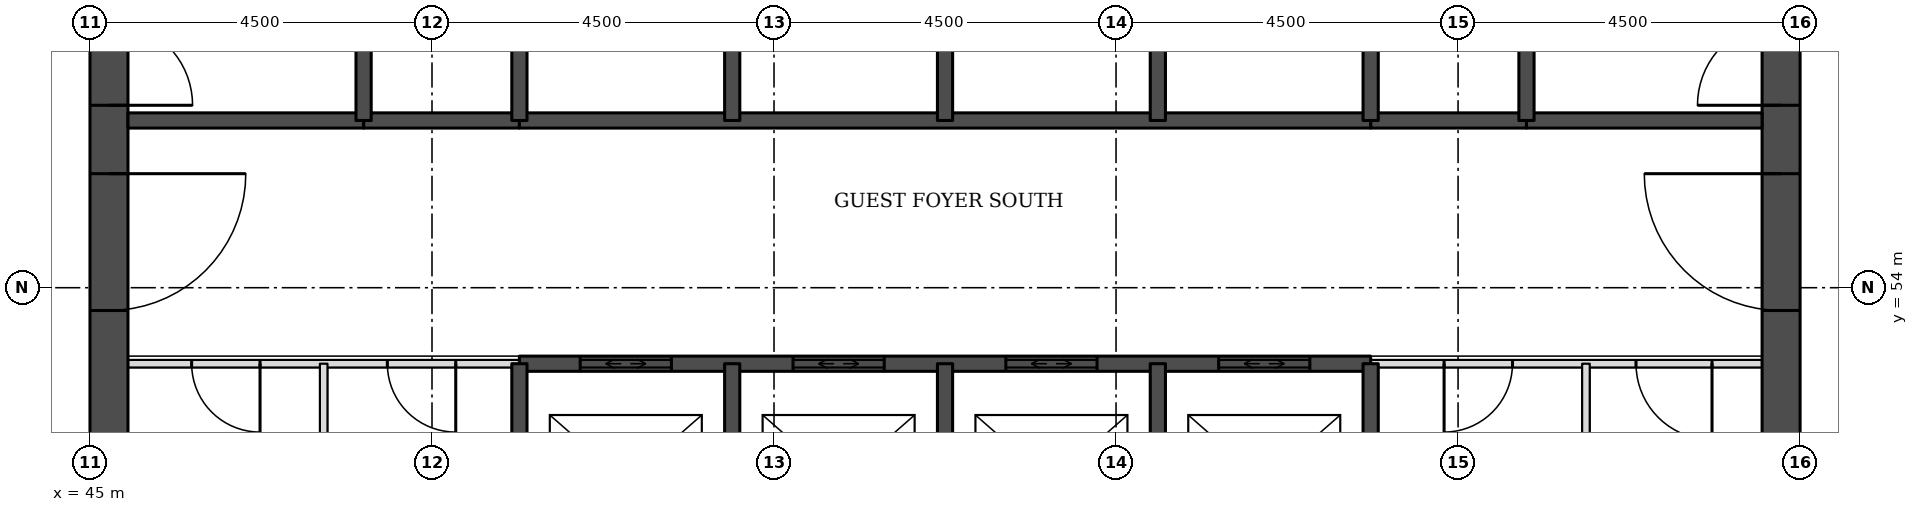
"""IFC4 building model, lengths in metres.
Left out: names, types, materials, properties, quantities, classifications, styles, units other than length and angle.
Written with IfcOpenShell. Run it as: python <this file> out.ifc"""

import sys

from ifc_helpers import new_model, si_unit, direction, frame, frame_2d, origin, place, context, subcontext, project, spatial, rectangle, extrude, element, fill, save


model = new_model("IFC4")
c1 = context("Model", 3, precision=1e-05, world=origin(), true_north=direction((0.0, 1.0)))
c2 = subcontext(c1, "Body", "Model", "MODEL_VIEW")
j1 = project(units=[si_unit("LENGTHUNIT", "METRE"), si_unit("PLANEANGLEUNIT", "RADIAN")], contexts=[c1])
p1 = place(None, origin())
s1 = spatial("IfcSite", under=j1, at=p1, CompositionType="ELEMENT")
p2 = place(p1, origin())
s2 = spatial("IfcBuilding", under=s1, at=p2, CompositionType="ELEMENT")
p3 = place(p2, frame((0.0, 0.0, 62.7)))
s3 = spatial("IfcBuildingStorey", under=s2, at=p3, CompositionType="ELEMENT", Elevation=62.7)
p4 = place(p3, frame((45.25, 49.5, 0.0), z_axis=(0.0, 0.0, 1.0), x_axis=(0.0, 1.0, 0.0)))
e1 = element("IfcWall", 1, at=p4, inside=s3, PredefinedType="SHEAR", context=c2, shape_type="SweptSolid", body=[
    extrude(rectangle(XDim=22.5, YDim=0.5, at=frame_2d((11.25, 0.0))), origin(), (0.0, 0.0, 1.0), 3.3),
])
p5 = place(p4, frame((4.2, 0.0, 0.0)))
e2 = element("IfcOpeningElement", 2, at=p5, cuts=e1, PredefinedType="OPENING", context=c2, shape_type="SweptSolid", body=[
    extrude(rectangle(XDim=1.8, YDim=2.1, at=frame_2d((0.9, 1.05))), frame((0.0, 0.26, 0.0), z_axis=(0.0, -1.0, 0.0), x_axis=(1.0, 0.0, 0.0)), (0.0, 0.0, 1.0), 0.52),
])
p6 = place(p4, frame((6.9, 0.0, 0.0)))
e3 = element("IfcOpeningElement", 3, at=p6, cuts=e1, PredefinedType="OPENING", context=c2, shape_type="SweptSolid", body=[
    extrude(rectangle(XDim=1.1, YDim=2.1, at=frame_2d((0.55, 1.05))), frame((0.0, 0.26, 0.0), z_axis=(0.0, -1.0, 0.0), x_axis=(1.0, 0.0, 0.0)), (0.0, 0.0, 1.0), 0.52),
])
p7 = place(p4, frame((13.6, 0.0, 0.0)))
e4 = element("IfcOpeningElement", 4, at=p7, cuts=e1, PredefinedType="OPENING", context=c2, shape_type="SweptSolid", body=[
    extrude(rectangle(XDim=1.1, YDim=2.1, at=frame_2d((0.55, 1.05))), frame((0.0, 0.26, 0.0), z_axis=(0.0, -1.0, 0.0), x_axis=(1.0, 0.0, 0.0)), (0.0, 0.0, 1.0), 0.52),
])
p8 = place(p4, frame((16.5, 0.0, 0.0)))
e5 = element("IfcOpeningElement", 5, at=p8, cuts=e1, PredefinedType="OPENING", context=c2, shape_type="SweptSolid", body=[
    extrude(rectangle(XDim=1.8, YDim=2.1, at=frame_2d((0.9, 1.05))), frame((0.0, 0.26, 0.0), z_axis=(0.0, -1.0, 0.0), x_axis=(1.0, 0.0, 0.0)), (0.0, 0.0, 1.0), 0.52),
])
p9 = place(p3, frame((67.25, 49.5, 0.0), z_axis=(0.0, 0.0, 1.0), x_axis=(0.0, 1.0, 0.0)))
e6 = element("IfcWall", 6, at=p9, inside=s3, PredefinedType="SHEAR", context=c2, shape_type="SweptSolid", body=[
    extrude(rectangle(XDim=22.5, YDim=0.5, at=frame_2d((11.25, 0.0))), origin(), (0.0, 0.0, 1.0), 3.3),
])
p10 = place(p9, frame((4.2, 0.0, 0.0)))
e7 = element("IfcOpeningElement", 7, at=p10, cuts=e6, PredefinedType="OPENING", context=c2, shape_type="SweptSolid", body=[
    extrude(rectangle(XDim=1.8, YDim=2.1, at=frame_2d((0.9, 1.05))), frame((0.0, 0.26, 0.0), z_axis=(0.0, -1.0, 0.0), x_axis=(1.0, 0.0, 0.0)), (0.0, 0.0, 1.0), 0.52),
])
p11 = place(p9, frame((6.9, 0.0, 0.0)))
e8 = element("IfcOpeningElement", 8, at=p11, cuts=e6, PredefinedType="OPENING", context=c2, shape_type="SweptSolid", body=[
    extrude(rectangle(XDim=1.1, YDim=2.1, at=frame_2d((0.55, 1.05))), frame((0.0, 0.26, 0.0), z_axis=(0.0, -1.0, 0.0), x_axis=(1.0, 0.0, 0.0)), (0.0, 0.0, 1.0), 0.52),
])
p12 = place(p9, frame((13.6, 0.0, 0.0)))
e9 = element("IfcOpeningElement", 9, at=p12, cuts=e6, PredefinedType="OPENING", context=c2, shape_type="SweptSolid", body=[
    extrude(rectangle(XDim=1.1, YDim=2.1, at=frame_2d((0.55, 1.05))), frame((0.0, 0.26, 0.0), z_axis=(0.0, -1.0, 0.0), x_axis=(1.0, 0.0, 0.0)), (0.0, 0.0, 1.0), 0.52),
])
p13 = place(p9, frame((16.5, 0.0, 0.0)))
e10 = element("IfcOpeningElement", 10, at=p13, cuts=e6, PredefinedType="OPENING", context=c2, shape_type="SweptSolid", body=[
    extrude(rectangle(XDim=1.8, YDim=2.1, at=frame_2d((0.9, 1.05))), frame((0.0, 0.26, 0.0), z_axis=(0.0, -1.0, 0.0), x_axis=(1.0, 0.0, 0.0)), (0.0, 0.0, 1.0), 0.52),
])
p14 = place(p3, frame((45.5, 53.0, 0.0), z_axis=(0.0, 0.0, 1.0), x_axis=(1.0, 0.0, 0.0)))
e11 = element("IfcWall", 11, at=p14, inside=s3, PredefinedType="PARTITIONING", context=c2, shape_type="SweptSolid", body=[
    extrude(rectangle(XDim=5.15, YDim=0.1, at=frame_2d((2.575, 0.0))), origin(), (0.0, 0.0, 1.0), 3.08),
])
p15 = place(p14, frame((0.837, 0.0, 0.0)))
e12 = element("IfcOpeningElement", 12, at=p15, cuts=e11, PredefinedType="OPENING", context=c2, shape_type="SweptSolid", body=[
    extrude(rectangle(XDim=0.9, YDim=2.1, at=frame_2d((0.45, 1.05))), frame((0.0, 0.06, 0.0), z_axis=(0.0, -1.0, 0.0), x_axis=(1.0, 0.0, 0.0)), (0.0, 0.0, 1.0), 0.12),
])
p16 = place(p14, frame((3.413, 0.0, 0.0)))
e13 = element("IfcOpeningElement", 13, at=p16, cuts=e11, PredefinedType="OPENING", context=c2, shape_type="SweptSolid", body=[
    extrude(rectangle(XDim=0.9, YDim=2.1, at=frame_2d((0.45, 1.05))), frame((0.0, 0.06, 0.0), z_axis=(0.0, -1.0, 0.0), x_axis=(1.0, 0.0, 0.0)), (0.0, 0.0, 1.0), 0.12),
])
p17 = place(p3, frame((61.85, 53.0, 0.0), z_axis=(0.0, 0.0, 1.0), x_axis=(1.0, 0.0, 0.0)))
e14 = element("IfcWall", 14, at=p17, inside=s3, PredefinedType="PARTITIONING", context=c2, shape_type="SweptSolid", body=[
    extrude(rectangle(XDim=5.15, YDim=0.1, at=frame_2d((2.575, 0.0))), origin(), (0.0, 0.0, 1.0), 3.08),
])
p18 = place(p17, frame((3.491, 0.0, 0.0)))
e15 = element("IfcOpeningElement", 15, at=p18, cuts=e14, PredefinedType="OPENING", context=c2, shape_type="SweptSolid", body=[
    extrude(rectangle(XDim=1.0, YDim=2.1, at=frame_2d((0.5, 1.05))), frame((0.0, 0.06, 0.0), z_axis=(0.0, -1.0, 0.0), x_axis=(1.0, 0.0, 0.0)), (0.0, 0.0, 1.0), 0.12),
])
p19 = place(p17, frame((0.966, 0.0, 0.0)))
e16 = element("IfcOpeningElement", 16, at=p19, cuts=e14, PredefinedType="OPENING", context=c2, shape_type="SweptSolid", body=[
    extrude(rectangle(XDim=0.9, YDim=2.1, at=frame_2d((0.45, 1.05))), frame((0.0, 0.06, 0.0), z_axis=(0.0, -1.0, 0.0), x_axis=(1.0, 0.0, 0.0)), (0.0, 0.0, 1.0), 0.12),
])
p20 = place(p3, frame((50.65, 53.0, 0.0), z_axis=(0.0, 0.0, 1.0), x_axis=(1.0, 0.0, 0.0)))
e17 = element("IfcWall", 17, at=p20, inside=s3, PredefinedType="SOLIDWALL", context=c2, shape_type="SweptSolid", body=[
    extrude(rectangle(XDim=11.2, YDim=0.2, at=frame_2d((5.6, 0.0))), origin(), (0.0, 0.0, 1.0), 3.08),
])
p21 = place(p20, frame((0.8, 0.0, 0.0)))
e18 = element("IfcOpeningElement", 18, at=p21, cuts=e17, PredefinedType="OPENING", context=c2, shape_type="SweptSolid", body=[
    extrude(rectangle(XDim=1.2, YDim=2.1, at=frame_2d((0.6, 1.05))), frame((0.0, 0.11, 0.0), z_axis=(0.0, -1.0, 0.0), x_axis=(1.0, 0.0, 0.0)), (0.0, 0.0, 1.0), 0.22),
])
p22 = place(p20, frame((3.6, 0.0, 0.0)))
e19 = element("IfcOpeningElement", 19, at=p22, cuts=e17, PredefinedType="OPENING", context=c2, shape_type="SweptSolid", body=[
    extrude(rectangle(XDim=1.2, YDim=2.1, at=frame_2d((0.6, 1.05))), frame((0.0, 0.11, 0.0), z_axis=(0.0, -1.0, 0.0), x_axis=(1.0, 0.0, 0.0)), (0.0, 0.0, 1.0), 0.22),
])
p23 = place(p20, frame((6.4, 0.0, 0.0)))
e20 = element("IfcOpeningElement", 20, at=p23, cuts=e17, PredefinedType="OPENING", context=c2, shape_type="SweptSolid", body=[
    extrude(rectangle(XDim=1.2, YDim=2.1, at=frame_2d((0.6, 1.05))), frame((0.0, 0.11, 0.0), z_axis=(0.0, -1.0, 0.0), x_axis=(1.0, 0.0, 0.0)), (0.0, 0.0, 1.0), 0.22),
])
p24 = place(p20, frame((9.2, 0.0, 0.0)))
e21 = element("IfcOpeningElement", 21, at=p24, cuts=e17, PredefinedType="OPENING", context=c2, shape_type="SweptSolid", body=[
    extrude(rectangle(XDim=1.2, YDim=2.1, at=frame_2d((0.6, 1.05))), frame((0.0, 0.11, 0.0), z_axis=(0.0, -1.0, 0.0), x_axis=(1.0, 0.0, 0.0)), (0.0, 0.0, 1.0), 0.22),
])
for number, where, z_axis, x_axis in (
    (22, (48.6, 56.2, 0.0), (0.0, 0.0, 1.0), (1.0, 0.0, 0.0)),
    (23, (61.85, 56.2, 0.0), (0.0, 0.0, 1.0), (1.0, 0.0, 0.0)),
):
    element("IfcWall", number, at=place(p3, frame(where, z_axis=z_axis, x_axis=x_axis)), inside=s3, PredefinedType="SOLIDWALL", context=c2, shape_type="SweptSolid", body=[
        extrude(rectangle(XDim=2.05, YDim=0.2, at=frame_2d((1.025, 0.0))), origin(), (0.0, 0.0, 1.0), 3.08),
    ])
p25 = place(p3, frame((45.5, 56.2, 0.0), z_axis=(0.0, 0.0, 1.0), x_axis=(1.0, 0.0, 0.0)))
e24 = element("IfcWall", 24, at=p25, inside=s3, PredefinedType="SOLIDWALL", context=c2, shape_type="SweptSolid", body=[
    extrude(rectangle(XDim=3.1, YDim=0.2, at=frame_2d((1.55, 0.0))), origin(), (0.0, 0.0, 1.0), 3.08),
])
p26 = place(p3, frame((50.65, 56.2, 0.0), z_axis=(0.0, 0.0, 1.0), x_axis=(1.0, 0.0, 0.0)))
e25 = element("IfcWall", 25, at=p26, inside=s3, PredefinedType="SOLIDWALL", context=c2, shape_type="SweptSolid", body=[
    extrude(rectangle(XDim=11.2, YDim=0.2, at=frame_2d((5.6, 0.0))), origin(), (0.0, 0.0, 1.0), 3.08),
])
p27 = place(p3, frame((63.9, 56.2, 0.0), z_axis=(0.0, 0.0, 1.0), x_axis=(1.0, 0.0, 0.0)))
e26 = element("IfcWall", 26, at=p27, inside=s3, PredefinedType="SOLIDWALL", context=c2, shape_type="SweptSolid", body=[
    extrude(rectangle(XDim=3.1, YDim=0.2, at=frame_2d((1.55, 0.0))), origin(), (0.0, 0.0, 1.0), 3.08),
])
p28 = place(p3, frame((48.075, 50.0, 0.0), z_axis=(0.0, 0.0, 1.0), x_axis=(0.0, 1.0, 0.0)))
e27 = element("IfcWall", 27, at=p28, inside=s3, PredefinedType="PARTITIONING", context=c2, shape_type="SweptSolid", body=[
    extrude(rectangle(XDim=3.0, YDim=0.1, at=frame_2d((1.5, 0.0))), origin(), (0.0, 0.0, 1.0), 3.08),
])
p29 = place(p3, frame((48.6, 56.2, 0.0), z_axis=(0.0, 0.0, 1.0), x_axis=(0.0, 1.0, 0.0)))
e28 = element("IfcWall", 28, at=p29, inside=s3, PredefinedType="SOLIDWALL", context=c2, shape_type="SweptSolid", body=[
    extrude(rectangle(XDim=5.8, YDim=0.2, at=frame_2d((2.9, 0.0))), origin(), (0.0, 0.0, 1.0), 3.08),
])
p30 = place(p3, frame((50.65, 50.0, 0.0), z_axis=(0.0, 0.0, 1.0), x_axis=(0.0, 1.0, 0.0)))
e29 = element("IfcWall", 29, at=p30, inside=s3, PredefinedType="SOLIDWALL", context=c2, shape_type="SweptSolid", body=[
    extrude(rectangle(XDim=3.0, YDim=0.2, at=frame_2d((1.5, 0.0))), origin(), (0.0, 0.0, 1.0), 3.08),
])
p31 = place(p3, frame((50.65, 56.2, 0.0), z_axis=(0.0, 0.0, 1.0), x_axis=(0.0, 1.0, 0.0)))
e30 = element("IfcWall", 30, at=p31, inside=s3, PredefinedType="SOLIDWALL", context=c2, shape_type="SweptSolid", body=[
    extrude(rectangle(XDim=2.8, YDim=0.2, at=frame_2d((1.4, 0.0))), origin(), (0.0, 0.0, 1.0), 3.08),
])
p32 = place(p3, frame((53.45, 50.0, 0.0), z_axis=(0.0, 0.0, 1.0), x_axis=(0.0, 1.0, 0.0)))
e31 = element("IfcWall", 31, at=p32, inside=s3, PredefinedType="SOLIDWALL", context=c2, shape_type="SweptSolid", body=[
    extrude(rectangle(XDim=3.0, YDim=0.2, at=frame_2d((1.5, 0.0))), origin(), (0.0, 0.0, 1.0), 3.08),
])
p33 = place(p3, frame((53.45, 56.2, 0.0), z_axis=(0.0, 0.0, 1.0), x_axis=(0.0, 1.0, 0.0)))
e32 = element("IfcWall", 32, at=p33, inside=s3, PredefinedType="SOLIDWALL", context=c2, shape_type="SweptSolid", body=[
    extrude(rectangle(XDim=2.8, YDim=0.2, at=frame_2d((1.4, 0.0))), origin(), (0.0, 0.0, 1.0), 3.08),
])
p34 = place(p3, frame((56.25, 50.0, 0.0), z_axis=(0.0, 0.0, 1.0), x_axis=(0.0, 1.0, 0.0)))
e33 = element("IfcWall", 33, at=p34, inside=s3, PredefinedType="SOLIDWALL", context=c2, shape_type="SweptSolid", body=[
    extrude(rectangle(XDim=3.0, YDim=0.2, at=frame_2d((1.5, 0.0))), origin(), (0.0, 0.0, 1.0), 3.08),
])
p35 = place(p3, frame((56.25, 56.2, 0.0), z_axis=(0.0, 0.0, 1.0), x_axis=(0.0, 1.0, 0.0)))
e34 = element("IfcWall", 34, at=p35, inside=s3, PredefinedType="SOLIDWALL", context=c2, shape_type="SweptSolid", body=[
    extrude(rectangle(XDim=2.8, YDim=0.2, at=frame_2d((1.4, 0.0))), origin(), (0.0, 0.0, 1.0), 3.08),
])
p36 = place(p3, frame((59.05, 50.0, 0.0), z_axis=(0.0, 0.0, 1.0), x_axis=(0.0, 1.0, 0.0)))
e35 = element("IfcWall", 35, at=p36, inside=s3, PredefinedType="SOLIDWALL", context=c2, shape_type="SweptSolid", body=[
    extrude(rectangle(XDim=3.0, YDim=0.2, at=frame_2d((1.5, 0.0))), origin(), (0.0, 0.0, 1.0), 3.08),
])
p37 = place(p3, frame((59.05, 56.2, 0.0), z_axis=(0.0, 0.0, 1.0), x_axis=(0.0, 1.0, 0.0)))
e36 = element("IfcWall", 36, at=p37, inside=s3, PredefinedType="SOLIDWALL", context=c2, shape_type="SweptSolid", body=[
    extrude(rectangle(XDim=2.8, YDim=0.2, at=frame_2d((1.4, 0.0))), origin(), (0.0, 0.0, 1.0), 3.08),
])
p38 = place(p3, frame((61.85, 50.0, 0.0), z_axis=(0.0, 0.0, 1.0), x_axis=(0.0, 1.0, 0.0)))
e37 = element("IfcWall", 37, at=p38, inside=s3, PredefinedType="SOLIDWALL", context=c2, shape_type="SweptSolid", body=[
    extrude(rectangle(XDim=3.0, YDim=0.2, at=frame_2d((1.5, 0.0))), origin(), (0.0, 0.0, 1.0), 3.08),
])
p39 = place(p3, frame((61.85, 56.2, 0.0), z_axis=(0.0, 0.0, 1.0), x_axis=(0.0, 1.0, 0.0)))
e38 = element("IfcWall", 38, at=p39, inside=s3, PredefinedType="SOLIDWALL", context=c2, shape_type="SweptSolid", body=[
    extrude(rectangle(XDim=2.8, YDim=0.2, at=frame_2d((1.4, 0.0))), origin(), (0.0, 0.0, 1.0), 3.08),
])
p40 = place(p3, frame((63.9, 56.2, 0.0), z_axis=(0.0, 0.0, 1.0), x_axis=(0.0, 1.0, 0.0)))
e39 = element("IfcWall", 39, at=p40, inside=s3, PredefinedType="SOLIDWALL", context=c2, shape_type="SweptSolid", body=[
    extrude(rectangle(XDim=5.8, YDim=0.2, at=frame_2d((2.9, 0.0))), origin(), (0.0, 0.0, 1.0), 3.08),
])
p41 = place(p3, frame((64.683, 50.0, 0.0), z_axis=(0.0, 0.0, 1.0), x_axis=(0.0, 1.0, 0.0)))
e40 = element("IfcWall", 40, at=p41, inside=s3, PredefinedType="PARTITIONING", context=c2, shape_type="SweptSolid", body=[
    extrude(rectangle(XDim=3.0, YDim=0.1, at=frame_2d((1.5, 0.0))), origin(), (0.0, 0.0, 1.0), 3.08),
])
p42 = place(p21, origin())
e41 = element("IfcDoor", 41, at=p42, inside=s3, OperationType="DOUBLE_DOOR_SLIDING", PredefinedType="DOOR", context=c2, shape_type="SweptSolid", body=[
    extrude(rectangle(XDim=1.2, YDim=2.1, at=frame_2d((0.6, 1.05))), frame((0.0, 0.025, 0.0), z_axis=(0.0, -1.0, 0.0), x_axis=(1.0, 0.0, 0.0)), (0.0, 0.0, 1.0), 0.05),
])
fill(e18, e41)
p43 = place(p22, origin())
e42 = element("IfcDoor", 42, at=p43, inside=s3, OperationType="DOUBLE_DOOR_SLIDING", PredefinedType="DOOR", context=c2, shape_type="SweptSolid", body=[
    extrude(rectangle(XDim=1.2, YDim=2.1, at=frame_2d((0.6, 1.05))), frame((0.0, 0.025, 0.0), z_axis=(0.0, -1.0, 0.0), x_axis=(1.0, 0.0, 0.0)), (0.0, 0.0, 1.0), 0.05),
])
fill(e19, e42)
p44 = place(p23, origin())
e43 = element("IfcDoor", 43, at=p44, inside=s3, OperationType="DOUBLE_DOOR_SLIDING", PredefinedType="DOOR", context=c2, shape_type="SweptSolid", body=[
    extrude(rectangle(XDim=1.2, YDim=2.1, at=frame_2d((0.6, 1.05))), frame((0.0, 0.025, 0.0), z_axis=(0.0, -1.0, 0.0), x_axis=(1.0, 0.0, 0.0)), (0.0, 0.0, 1.0), 0.05),
])
fill(e20, e43)
p45 = place(p24, origin())
e44 = element("IfcDoor", 44, at=p45, inside=s3, OperationType="DOUBLE_DOOR_SLIDING", PredefinedType="DOOR", context=c2, shape_type="SweptSolid", body=[
    extrude(rectangle(XDim=1.2, YDim=2.1, at=frame_2d((0.6, 1.05))), frame((0.0, 0.025, 0.0), z_axis=(0.0, -1.0, 0.0), x_axis=(1.0, 0.0, 0.0)), (0.0, 0.0, 1.0), 0.05),
])
fill(e21, e44)
p46 = place(p5, frame((1.8, 0.0, 0.0), z_axis=(0.0, 0.0, 1.0), x_axis=(-1.0, 0.0, 0.0)))
e45 = element("IfcDoor", 45, at=p46, inside=s3, OperationType="SINGLE_SWING_LEFT", PredefinedType="DOOR", context=c2, shape_type="SweptSolid", body=[
    extrude(rectangle(XDim=1.8, YDim=2.1, at=frame_2d((0.9, 1.05))), frame((0.0, 0.025, 0.0), z_axis=(0.0, -1.0, 0.0), x_axis=(1.0, 0.0, 0.0)), (0.0, 0.0, 1.0), 0.05),
])
fill(e2, e45)
p47 = place(p6, frame((1.1, 0.0, 0.0), z_axis=(0.0, 0.0, 1.0), x_axis=(-1.0, 0.0, 0.0)))
e46 = element("IfcDoor", 46, at=p47, inside=s3, OperationType="SINGLE_SWING_RIGHT", PredefinedType="DOOR", context=c2, shape_type="SweptSolid", body=[
    extrude(rectangle(XDim=1.1, YDim=2.1, at=frame_2d((0.55, 1.05))), frame((0.0, 0.025, 0.0), z_axis=(0.0, -1.0, 0.0), x_axis=(1.0, 0.0, 0.0)), (0.0, 0.0, 1.0), 0.05),
])
fill(e3, e46)
p48 = place(p10, origin())
e47 = element("IfcDoor", 47, at=p48, inside=s3, OperationType="SINGLE_SWING_RIGHT", PredefinedType="DOOR", context=c2, shape_type="SweptSolid", body=[
    extrude(rectangle(XDim=1.8, YDim=2.1, at=frame_2d((0.9, 1.05))), frame((0.0, 0.025, 0.0), z_axis=(0.0, -1.0, 0.0), x_axis=(1.0, 0.0, 0.0)), (0.0, 0.0, 1.0), 0.05),
])
fill(e7, e47)
p49 = place(p11, origin())
e48 = element("IfcDoor", 48, at=p49, inside=s3, OperationType="SINGLE_SWING_LEFT", PredefinedType="DOOR", context=c2, shape_type="SweptSolid", body=[
    extrude(rectangle(XDim=1.1, YDim=2.1, at=frame_2d((0.55, 1.05))), frame((0.0, 0.025, 0.0), z_axis=(0.0, -1.0, 0.0), x_axis=(1.0, 0.0, 0.0)), (0.0, 0.0, 1.0), 0.05),
])
fill(e8, e48)
p50 = place(p18, frame((1.0, 0.0, 0.0), z_axis=(0.0, 0.0, 1.0), x_axis=(-1.0, 0.0, 0.0)))
e49 = element("IfcDoor", 49, at=p50, inside=s3, OperationType="SINGLE_SWING_LEFT", PredefinedType="DOOR", context=c2, shape_type="SweptSolid", body=[
    extrude(rectangle(XDim=1.0, YDim=2.1, at=frame_2d((0.5, 1.05))), frame((0.0, 0.025, 0.0), z_axis=(0.0, -1.0, 0.0), x_axis=(1.0, 0.0, 0.0)), (0.0, 0.0, 1.0), 0.05),
])
fill(e15, e49)
p51 = place(p19, frame((0.9, 0.0, 0.0), z_axis=(0.0, 0.0, 1.0), x_axis=(-1.0, 0.0, 0.0)))
e50 = element("IfcDoor", 50, at=p51, inside=s3, OperationType="SINGLE_SWING_RIGHT", PredefinedType="DOOR", context=c2, shape_type="SweptSolid", body=[
    extrude(rectangle(XDim=0.9, YDim=2.1, at=frame_2d((0.45, 1.05))), frame((0.0, 0.025, 0.0), z_axis=(0.0, -1.0, 0.0), x_axis=(1.0, 0.0, 0.0)), (0.0, 0.0, 1.0), 0.05),
])
fill(e16, e50)
p52 = place(p15, frame((0.9, 0.0, 0.0), z_axis=(0.0, 0.0, 1.0), x_axis=(-1.0, 0.0, 0.0)))
e51 = element("IfcDoor", 51, at=p52, inside=s3, OperationType="SINGLE_SWING_LEFT", PredefinedType="DOOR", context=c2, shape_type="SweptSolid", body=[
    extrude(rectangle(XDim=0.9, YDim=2.1, at=frame_2d((0.45, 1.05))), frame((0.0, 0.025, 0.0), z_axis=(0.0, -1.0, 0.0), x_axis=(1.0, 0.0, 0.0)), (0.0, 0.0, 1.0), 0.05),
])
fill(e12, e51)
p53 = place(p16, frame((0.9, 0.0, 0.0), z_axis=(0.0, 0.0, 1.0), x_axis=(-1.0, 0.0, 0.0)))
e52 = element("IfcDoor", 52, at=p53, inside=s3, OperationType="SINGLE_SWING_LEFT", PredefinedType="DOOR", context=c2, shape_type="SweptSolid", body=[
    extrude(rectangle(XDim=0.9, YDim=2.1, at=frame_2d((0.45, 1.05))), frame((0.0, 0.025, 0.0), z_axis=(0.0, -1.0, 0.0), x_axis=(1.0, 0.0, 0.0)), (0.0, 0.0, 1.0), 0.05),
])
fill(e13, e52)
save(model, sys.argv[1])
